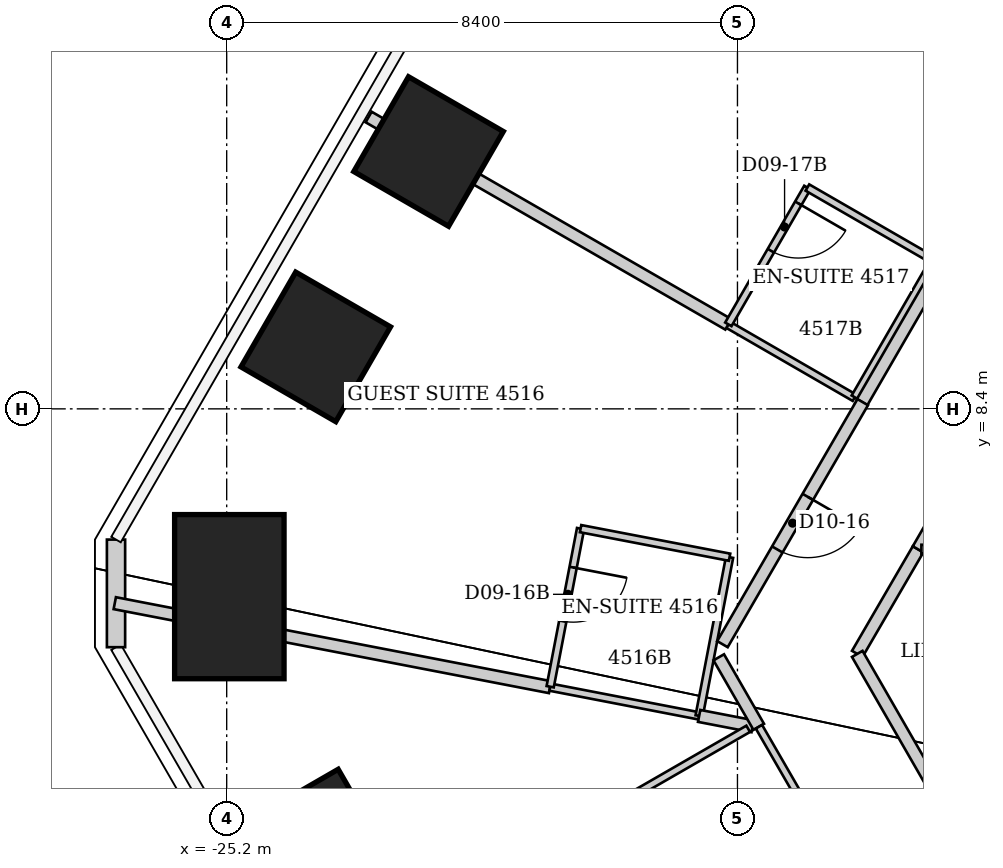
"""IFC4 building model, lengths in metres.
Left out: names, types, materials, properties, quantities, classifications, styles, units other than length and angle.
Written with IfcOpenShell. Run it as: python <this file> out.ifc"""

import sys

from ifc_helpers import new_model, si_unit, direction, frame, frame_2d, origin, origin_2d, place, context, subcontext, project, spatial, rectangle, extrude, element, fill, save


model = new_model("IFC4")
c1 = context("Model", 3, precision=1e-05, world=origin(), true_north=direction((0.0, 1.0)))
c2 = subcontext(c1, "Body", "Model", "MODEL_VIEW")
j1 = project(units=[si_unit("LENGTHUNIT", "METRE"), si_unit("PLANEANGLEUNIT", "RADIAN")], contexts=[c1])
p1 = place(None, origin())
s1 = spatial("IfcSite", under=j1, at=p1, CompositionType="ELEMENT")
p2 = place(p1, origin())
s2 = spatial("IfcBuilding", under=s1, at=p2, CompositionType="ELEMENT")
p3 = place(p2, frame((0.0, 0.0, 183.2)))
s3 = spatial("IfcBuildingStorey", under=s2, at=p3, CompositionType="ELEMENT", Elevation=183.2)
p4 = place(p3, frame((-23.696, 1.242, 0.0), z_axis=(0.0, 0.0, 1.0), x_axis=(-0.866025403784, -0.5, 0.0)))
e1 = element("IfcColumn", 1, at=p4, inside=s3, PredefinedType="COLUMN", context=c2, shape_type="SweptSolid", body=[
    extrude(rectangle(XDim=1.8, YDim=1.8, at=origin_2d()), origin(), (0.0, 0.0, 1.0), 3.8),
])
p5 = place(p3, frame((-25.156, 5.311, 0.0), z_axis=(0.0, 0.0, 1.0), x_axis=(-1.0, 0.0, 0.0)))
e2 = element("IfcColumn", 2, at=p5, inside=s3, PredefinedType="COLUMN", context=c2, shape_type="SweptSolid", body=[
    extrude(rectangle(XDim=1.8, YDim=2.7, at=origin_2d()), origin(), (0.0, 0.0, 1.0), 3.8),
])
for number, where, z_axis, x_axis in (
    (3, (-23.735, 9.419, 0.0), (0.0, 0.0, 1.0), (-0.866, 0.5, 0.0)),
    (4, (-21.88, 12.633, 0.0), (0.0, 0.0, 1.0), (-0.866, 0.5, 0.0)),
):
    element("IfcColumn", number, at=place(p3, frame(where, z_axis=z_axis, x_axis=x_axis)), inside=s3, PredefinedType="COLUMN", context=c2, shape_type="SweptSolid", body=[
        extrude(rectangle(XDim=1.8, YDim=1.8, at=origin_2d()), origin(), (0.0, 0.0, 1.0), 3.8),
    ])
p6 = place(p3, frame((-27.02, 4.48, 0.0), z_axis=(0.0, 0.0, 1.0), x_axis=(0.0, 1.0, 0.0)))
e5 = element("IfcWall", 5, at=p6, inside=s3, PredefinedType="SOLIDWALL", context=c2, shape_type="SweptSolid", body=[
    extrude(rectangle(XDim=1.77, YDim=0.3, at=frame_2d((0.885, 0.0))), origin(), (0.0, 0.0, 1.0), 3.64),
])
p7 = place(p3, frame((-27.041, 5.204, 0.0), z_axis=(0.0, 0.0, 1.0), x_axis=(0.981883480928, -0.189485698355, 0.0)))
e6 = element("IfcWall", 6, at=p7, inside=s3, PredefinedType="PARTITIONING", context=c2, shape_type="SweptSolid", body=[
    extrude(rectangle(XDim=7.291, YDim=0.2, at=frame_2d((3.646, 0.0))), origin(), (0.0, 0.0, 1.0), 3.64),
])
p8 = place(p3, frame((-19.881, 3.823, 0.0), z_axis=(0.0, 0.0, 1.0), x_axis=(0.981896775229, -0.189416796496, 0.0)))
e7 = element("IfcWall", 7, at=p8, inside=s3, PredefinedType="PARTITIONING", context=c2, shape_type="SweptSolid", body=[
    extrude(rectangle(XDim=2.497, YDim=0.12, at=frame_2d((1.248, 0.0))), origin(), (0.0, 0.0, 1.0), 3.64),
])
p9 = place(p3, frame((-19.38, 6.43, 0.0), z_axis=(0.0, 0.0, 1.0), x_axis=(-0.18885765444, -0.982004473696, 0.0)))
e8 = element("IfcWall", 8, at=p9, inside=s3, PredefinedType="PARTITIONING", context=c2, shape_type="SweptSolid", body=[
    extrude(rectangle(XDim=2.647, YDim=0.12, at=frame_2d((1.324, 0.0))), origin(), (0.0, 0.0, 1.0), 3.64),
])
p10 = place(p9, frame((0.65, 0.0, 0.0)))
e9 = element("IfcOpeningElement", 9, at=p10, cuts=e8, PredefinedType="OPENING", context=c2, shape_type="SweptSolid", body=[
    extrude(rectangle(XDim=0.9, YDim=2.03, at=frame_2d((0.45, 1.015))), frame((0.0, 0.06, 0.0), z_axis=(0.0, -1.0, 0.0), x_axis=(1.0, 0.0, 0.0)), (0.0, 0.0, 1.0), 0.12),
])
p11 = place(p3, frame((-17.43, 3.35, 0.0), z_axis=(0.0, 0.0, 1.0), x_axis=(0.188159009227, 0.982138578433, 0.0)))
e10 = element("IfcWall", 10, at=p11, inside=s3, PredefinedType="PARTITIONING", context=c2, shape_type="SweptSolid", body=[
    extrude(rectangle(XDim=2.657, YDim=0.12, at=frame_2d((1.329, 0.0))), origin(), (0.0, 0.0, 1.0), 3.64),
])
p12 = place(p3, frame((-17.43, 3.35, 0.0), z_axis=(0.0, 0.0, 1.0), x_axis=(0.981858463983, -0.189615286052, 0.0)))
e11 = element("IfcWall", 11, at=p12, inside=s3, PredefinedType="PARTITIONING", context=c2, shape_type="SweptSolid", body=[
    extrude(rectangle(XDim=0.896, YDim=0.2, at=frame_2d((0.448, 0.0))), origin(), (0.0, 0.0, 1.0), 3.64),
])
p13 = place(p3, frame((-17.108, 4.314, 0.0), z_axis=(0.0, 0.0, 1.0), x_axis=(0.498488506644, -0.866896307954, 0.0)))
e12 = element("IfcWall", 12, at=p13, inside=s3, PredefinedType="PARTITIONING", context=c2, shape_type="SweptSolid", body=[
    extrude(rectangle(XDim=1.319, YDim=0.2, at=frame_2d((0.66, 0.0))), origin(), (0.0, 0.0, 1.0), 3.64),
])
p14 = place(p3, frame((-16.954, 9.783, 0.0), z_axis=(0.0, 0.0, 1.0), x_axis=(0.865862137391, -0.500282679124, 0.0)))
e13 = element("IfcWall", 13, at=p14, inside=s3, PredefinedType="PARTITIONING", context=c2, shape_type="SweptSolid", body=[
    extrude(rectangle(XDim=2.401, YDim=0.12, at=frame_2d((1.201, 0.0))), origin(), (0.0, 0.0, 1.0), 2.878),
])
p15 = place(p3, frame((-16.95, 9.79, 0.0), z_axis=(0.0, 0.0, 1.0), x_axis=(-0.866371236465, 0.499400521251, 0.0)))
e14 = element("IfcWall", 14, at=p15, inside=s3, PredefinedType="PARTITIONING", context=c2, shape_type="SweptSolid", body=[
    extrude(rectangle(XDim=6.829, YDim=0.2, at=frame_2d((3.414, 0.0))), origin(), (0.0, 0.0, 1.0), 2.878),
])
p16 = place(p3, frame((-16.93, 5.96, 0.0), z_axis=(0.0, 0.0, 1.0), x_axis=(-0.982097071605, 0.18837553436, 0.0)))
e15 = element("IfcWall", 15, at=p16, inside=s3, PredefinedType="PARTITIONING", context=c2, shape_type="SweptSolid", body=[
    extrude(rectangle(XDim=2.495, YDim=0.12, at=frame_2d((1.248, 0.0))), origin(), (0.0, 0.0, 1.0), 3.64),
])
p17 = place(p3, frame((-16.624, 3.138, 0.0), z_axis=(0.0, 0.0, 1.0), x_axis=(-0.866525185869, -0.499133351175, 0.0)))
e16 = element("IfcWall", 16, at=p17, inside=s3, PredefinedType="PARTITIONING", context=c2, shape_type="SweptSolid", body=[
    extrude(rectangle(XDim=2.5, YDim=0.12, at=frame_2d((1.25, 0.0))), origin(), (0.0, 0.0, 1.0), 3.038),
])
p18 = place(p3, frame((-16.447, 3.172, 0.0), z_axis=(0.0, 0.0, 1.0), x_axis=(0.500329330271, -0.865835181354, 0.0)))
e17 = element("IfcWall", 17, at=p18, inside=s3, PredefinedType="PARTITIONING", context=c2, shape_type="SweptSolid", body=[
    extrude(rectangle(XDim=2.437, YDim=0.12, at=frame_2d((1.219, 0.0))), origin(), (0.0, 0.0, 1.0), 3.64),
])
p19 = place(p3, frame((-15.65, 12.04, 0.0), z_axis=(0.0, 0.0, 1.0), x_axis=(-0.500291685314, -0.865856933682, 0.0)))
e18 = element("IfcWall", 18, at=p19, inside=s3, PredefinedType="PARTITIONING", context=c2, shape_type="SweptSolid", body=[
    extrude(rectangle(XDim=2.599, YDim=0.12, at=frame_2d((1.299, 0.0))), origin(), (0.0, 0.0, 1.0), 3.64),
])
p20 = place(p19, frame((0.3, 0.0, 0.0)))
e19 = element("IfcOpeningElement", 19, at=p20, cuts=e18, PredefinedType="OPENING", context=c2, shape_type="SweptSolid", body=[
    extrude(rectangle(XDim=0.9, YDim=2.03, at=frame_2d((0.45, 1.015))), frame((0.0, 0.06, 0.0), z_axis=(0.0, -1.0, 0.0), x_axis=(1.0, 0.0, 0.0)), (0.0, 0.0, 1.0), 0.12),
])
p21 = place(p3, frame((-14.87, 8.59, 0.0), z_axis=(0.0, 0.0, 1.0), x_axis=(0.500291685314, 0.865856933682, 0.0)))
e20 = element("IfcWall", 20, at=p21, inside=s3, PredefinedType="PARTITIONING", context=c2, shape_type="SweptSolid", body=[
    extrude(rectangle(XDim=2.599, YDim=0.12, at=frame_2d((1.299, 0.0))), origin(), (0.0, 0.0, 1.0), 3.64),
])
p22 = place(p3, frame((-14.83, 4.37, 0.0), z_axis=(0.0, 0.0, 1.0), x_axis=(0.502626855825, 0.864503466623, 0.0)))
e21 = element("IfcWall", 21, at=p22, inside=s3, PredefinedType="PARTITIONING", context=c2, shape_type="SweptSolid", body=[
    extrude(rectangle(XDim=1.99, YDim=0.2, at=frame_2d((0.995, 0.0))), origin(), (0.0, 0.0, 1.0), 3.64),
])
p23 = place(p3, frame((-14.827, 8.554, 0.0), z_axis=(0.0, 0.0, 1.0), x_axis=(0.865865073245, -0.500277597875, 0.0)))
e22 = element("IfcWall", 22, at=p23, inside=s3, PredefinedType="PARTITIONING", context=c2, shape_type="SweptSolid", body=[
    extrude(rectangle(XDim=0.089, YDim=0.2, at=frame_2d((0.044, 0.0))), origin(), (0.0, 0.0, 1.0), 3.64),
])
p24 = place(p3, frame((-14.75, 8.51, 0.0), z_axis=(0.0, 0.0, 1.0), x_axis=(0.500618647881, 0.86566793252, 0.0)))
e23 = element("IfcWall", 23, at=p24, inside=s3, PredefinedType="PARTITIONING", context=c2, shape_type="SweptSolid", body=[
    extrude(rectangle(XDim=4.794, YDim=0.2, at=frame_2d((2.397, 0.0))), origin(), (0.0, 0.0, 1.0), 3.64),
])
p25 = place(p24, frame((2.75, 0.0, 0.0)))
e24 = element("IfcOpeningElement", 24, at=p25, cuts=e23, PredefinedType="OPENING", context=c2, shape_type="SweptSolid", body=[
    extrude(rectangle(XDim=1.0, YDim=2.13, at=frame_2d((0.5, 1.065))), frame((0.0, 0.1, 0.0), z_axis=(0.0, -1.0, 0.0), x_axis=(1.0, 0.0, 0.0)), (0.0, 0.0, 1.0), 0.2),
])
p26 = place(p3, frame((-14.74, 8.51, 0.0), z_axis=(0.0, 0.0, 1.0), x_axis=(-0.501513165407, -0.865150012959, 0.0)))
e25 = element("IfcWall", 25, at=p26, inside=s3, PredefinedType="PARTITIONING", context=c2, shape_type="SweptSolid", body=[
    extrude(rectangle(XDim=4.6, YDim=0.2, at=frame_2d((2.3, 0.0))), origin(), (0.0, 0.0, 1.0), 3.64),
])
p27 = place(p26, frame((1.8, 0.0, 0.0)))
e26 = element("IfcOpeningElement", 26, at=p27, cuts=e25, PredefinedType="OPENING", context=c2, shape_type="SweptSolid", body=[
    extrude(rectangle(XDim=1.0, YDim=2.13, at=frame_2d((0.5, 1.065))), frame((0.0, 0.1, 0.0), z_axis=(0.0, -1.0, 0.0), x_axis=(1.0, 0.0, 0.0)), (0.0, 0.0, 1.0), 0.2),
])
p28 = place(p3, frame((-13.83, 6.09, 0.0), z_axis=(0.0, 0.0, 1.0), x_axis=(0.500248310865, 0.865881993967, 0.0)))
e27 = element("IfcWall", 27, at=p28, inside=s3, PredefinedType="PARTITIONING", context=c2, shape_type="SweptSolid", body=[
    extrude(rectangle(XDim=5.278, YDim=0.2, at=frame_2d((2.639, 0.0))), origin(), (0.0, 0.0, 1.0), 3.64),
])
p29 = place(p3, frame((-13.775, 6.09, 0.0), z_axis=(0.0, 0.0, 1.0), x_axis=(1.0, 0.0, 0.0)))
e28 = element("IfcWall", 28, at=p29, inside=s3, PredefinedType="PARTITIONING", context=c2, shape_type="SweptSolid", body=[
    extrude(rectangle(XDim=3.225, YDim=0.15, at=frame_2d((1.612, 0.0))), origin(), (0.0, 0.0, 1.0), 3.64),
])
p30 = place(p3, frame((-13.57, 10.84, 0.0), z_axis=(0.0, 0.0, 1.0), x_axis=(-0.866177122335, 0.499737123639, 0.0)))
e29 = element("IfcWall", 29, at=p30, inside=s3, PredefinedType="PARTITIONING", context=c2, shape_type="SweptSolid", body=[
    extrude(rectangle(XDim=2.401, YDim=0.12, at=frame_2d((1.201, 0.0))), origin(), (0.0, 0.0, 1.0), 3.64),
])
p31 = place(p3, frame((-13.19, 1.52, 0.0), z_axis=(0.0, 0.0, 1.0), x_axis=(-0.498775186059, 0.866731396554, 0.0)))
e30 = element("IfcWall", 30, at=p31, inside=s3, PredefinedType="PARTITIONING", context=c2, shape_type="SweptSolid", body=[
    extrude(rectangle(XDim=3.288, YDim=0.2, at=frame_2d((1.644, 0.0))), origin(), (0.0, 0.0, 1.0), 3.64),
])
p32 = place(p3, frame((-11.029, 12.74, 0.0), z_axis=(0.0, 0.0, 1.0), x_axis=(-0.654429261747, 0.756123231603, 0.0)))
e31 = element("IfcWall", 31, at=p32, inside=s3, PredefinedType="PARTITIONING", context=c2, shape_type="SweptSolid", body=[
    extrude(rectangle(XDim=10.683, YDim=0.2, at=frame_2d((5.342, 0.0))), origin(), (0.0, 0.0, 1.0), 3.64),
])
p33 = place(p27, origin())
e32 = element("IfcDoor", 32, at=p33, inside=s3, OperationType="SINGLE_SWING_LEFT", PredefinedType="DOOR", context=c2, shape_type="SweptSolid", body=[
    extrude(rectangle(XDim=1.0, YDim=2.13, at=frame_2d((0.5, 1.065))), frame((0.0, 0.025, 0.0), z_axis=(0.0, -1.0, 0.0), x_axis=(1.0, 0.0, 0.0)), (0.0, 0.0, 1.0), 0.05),
])
fill(e26, e32)
p34 = place(p10, origin())
e33 = element("IfcDoor", 33, at=p34, inside=s3, OperationType="SINGLE_SWING_LEFT", PredefinedType="DOOR", context=c2, shape_type="SweptSolid", body=[
    extrude(rectangle(XDim=0.9, YDim=2.03, at=frame_2d((0.45, 1.015))), frame((0.0, 0.025, 0.0), z_axis=(0.0, -1.0, 0.0), x_axis=(1.0, 0.0, 0.0)), (0.0, 0.0, 1.0), 0.05),
])
fill(e9, e33)
p35 = place(p20, origin())
e34 = element("IfcDoor", 34, at=p35, inside=s3, OperationType="SINGLE_SWING_LEFT", PredefinedType="DOOR", context=c2, shape_type="SweptSolid", body=[
    extrude(rectangle(XDim=0.9, YDim=2.03, at=frame_2d((0.45, 1.015))), frame((0.0, 0.025, 0.0), z_axis=(0.0, -1.0, 0.0), x_axis=(1.0, 0.0, 0.0)), (0.0, 0.0, 1.0), 0.05),
])
fill(e19, e34)
save(model, sys.argv[1])
